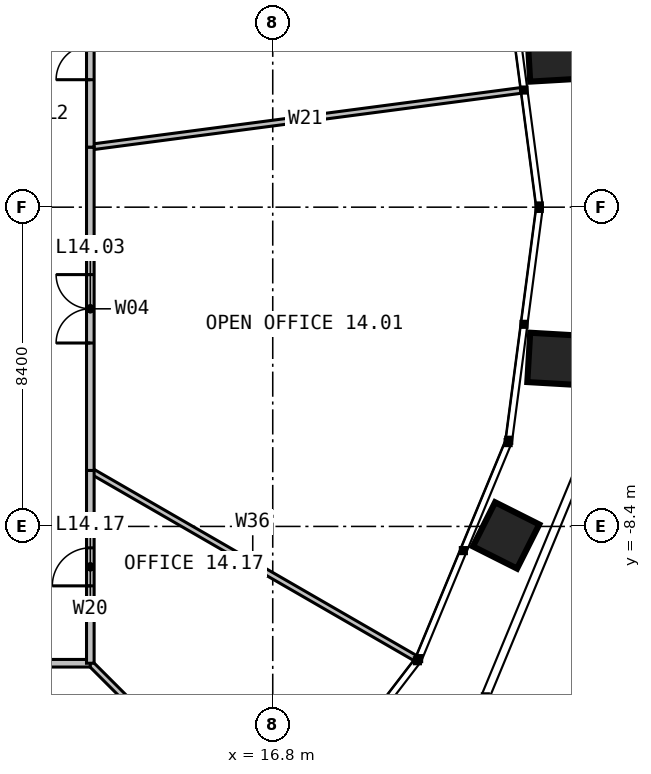
"""IFC4 building model, lengths in metres.
Left out: names, types, materials, properties, quantities, classifications, styles, units other than length and angle.
Written with IfcOpenShell. Run it as: python <this file> out.ifc"""

import sys

from ifc_helpers import new_model, si_unit, direction, frame, frame_2d, origin, place, context, subcontext, project, spatial, rectangle, extrude, element, fill, save


model = new_model("IFC4")
c1 = context("Model", 3, precision=1e-05, world=origin(), true_north=direction((0.0, 1.0)))
c2 = subcontext(c1, "Body", "Model", "MODEL_VIEW")
j1 = project(units=[si_unit("LENGTHUNIT", "METRE"), si_unit("PLANEANGLEUNIT", "RADIAN")], contexts=[c1])
p1 = place(None, origin())
s1 = spatial("IfcSite", under=j1, at=p1, CompositionType="ELEMENT")
p2 = place(p1, origin())
s2 = spatial("IfcBuilding", under=s1, at=p2, CompositionType="ELEMENT")
p3 = place(p2, frame((0.0, 0.0, 61.0)))
s3 = spatial("IfcBuildingStorey", under=s2, at=p3, CompositionType="ELEMENT", Elevation=61.0)
p4 = place(p3, frame((12.0, -6.928, 0.0), z_axis=(0.0, 0.0, 1.0), x_axis=(0.866031940362, -0.499988678145, 0.0)))
e1 = element("IfcWall", 1, at=p4, inside=s3, PredefinedType="PARTITIONING", context=c2, shape_type="SweptSolid", body=[
    extrude(rectangle(XDim=9.87, YDim=0.15, at=frame_2d((4.935, 0.0))), origin(), (0.0, 0.0, 1.0), 2.79),
])
p5 = place(p3, frame((12.0, 1.58, 0.0), z_axis=(0.0, 0.0, 1.0), x_axis=(0.99144592532, 0.130518110492, 0.0)))
e2 = element("IfcWall", 2, at=p5, inside=s3, PredefinedType="PARTITIONING", context=c2, shape_type="SweptSolid", body=[
    extrude(rectangle(XDim=11.42, YDim=0.15, at=frame_2d((5.71, 0.0))), origin(), (0.0, 0.0, 1.0), 2.79),
])
p6 = place(p3, frame((6.928, -12.0, 0.0), z_axis=(0.0, 0.0, 1.0), x_axis=(0.499988678145, -0.866031940362, 0.0)))
e3 = element("IfcWall", 3, at=p6, inside=s3, PredefinedType="PARTITIONING", context=c2, shape_type="SweptSolid", body=[
    extrude(rectangle(XDim=9.87, YDim=0.15, at=frame_2d((4.935, 0.0))), origin(), (0.0, 0.0, 1.0), 2.79),
])
p7 = place(p3, frame((12.0, -12.0, 0.0), z_axis=(0.0, 0.0, 1.0), x_axis=(0.707106781187, -0.707106781187, 0.0)))
e4 = element("IfcWall", 4, at=p7, inside=s3, PredefinedType="PARTITIONING", context=c2, shape_type="SweptSolid", body=[
    extrude(rectangle(XDim=6.756, YDim=0.15, at=frame_2d((3.378, 0.0))), origin(), (0.0, 0.0, 1.0), 2.79),
])
p8 = place(p3, frame((12.0, -6.928, 0.0), z_axis=(0.0, 0.0, 1.0), x_axis=(0.0, 1.0, 0.0)))
e5 = element("IfcWall", 5, at=p8, inside=s3, PredefinedType="PARTITIONING", context=c2, shape_type="SweptSolid", body=[
    extrude(rectangle(XDim=8.508, YDim=0.2, at=frame_2d((4.254, 0.0))), origin(), (0.0, 0.0, 1.0), 3.8),
])
p9 = place(p8, frame((3.354, 0.0, 0.0)))
e6 = element("IfcOpeningElement", 6, at=p9, cuts=e5, PredefinedType="OPENING", context=c2, shape_type="SweptSolid", body=[
    extrude(rectangle(XDim=1.8, YDim=2.2, at=frame_2d((0.9, 1.1))), frame((0.0, 0.11, 0.0), z_axis=(0.0, -1.0, 0.0), x_axis=(1.0, 0.0, 0.0)), (0.0, 0.0, 1.0), 0.22),
])
p10 = place(p3, frame((12.0, 1.58, 0.0), z_axis=(0.0, 0.0, 1.0), x_axis=(0.0, 1.0, 0.0)))
e7 = element("IfcWall", 7, at=p10, inside=s3, PredefinedType="PARTITIONING", context=c2, shape_type="SweptSolid", body=[
    extrude(rectangle(XDim=5.348, YDim=0.2, at=frame_2d((2.674, 0.0))), origin(), (0.0, 0.0, 1.0), 3.8),
])
p11 = place(p10, frame((1.774, 0.0, 0.0)))
e8 = element("IfcOpeningElement", 8, at=p11, cuts=e7, PredefinedType="OPENING", context=c2, shape_type="SweptSolid", body=[
    extrude(rectangle(XDim=1.8, YDim=2.2, at=frame_2d((0.9, 1.1))), frame((0.0, 0.11, 0.0), z_axis=(0.0, -1.0, 0.0), x_axis=(1.0, 0.0, 0.0)), (0.0, 0.0, 1.0), 0.22),
])
p12 = place(p3, frame((6.928, -12.0, 0.0), z_axis=(0.0, 0.0, 1.0), x_axis=(1.0, 0.0, 0.0)))
e9 = element("IfcWall", 9, at=p12, inside=s3, PredefinedType="PARTITIONING", context=c2, shape_type="SweptSolid", body=[
    extrude(rectangle(XDim=5.072, YDim=0.2, at=frame_2d((2.536, 0.0))), origin(), (0.0, 0.0, 1.0), 3.8),
])
p13 = place(p12, frame((2.036, 0.0, 0.0)))
e10 = element("IfcOpeningElement", 10, at=p13, cuts=e9, PredefinedType="OPENING", context=c2, shape_type="SweptSolid", body=[
    extrude(rectangle(XDim=1.0, YDim=2.2, at=frame_2d((0.5, 1.1))), frame((0.0, 0.11, 0.0), z_axis=(0.0, -1.0, 0.0), x_axis=(1.0, 0.0, 0.0)), (0.0, 0.0, 1.0), 0.22),
])
p14 = place(p3, frame((12.0, -12.0, 0.0), z_axis=(0.0, 0.0, 1.0), x_axis=(0.0, 1.0, 0.0)))
e11 = element("IfcWall", 11, at=p14, inside=s3, PredefinedType="PARTITIONING", context=c2, shape_type="SweptSolid", body=[
    extrude(rectangle(XDim=5.072, YDim=0.2, at=frame_2d((2.536, 0.0))), origin(), (0.0, 0.0, 1.0), 3.8),
])
p15 = place(p14, frame((2.036, 0.0, 0.0)))
e12 = element("IfcOpeningElement", 12, at=p15, cuts=e11, PredefinedType="OPENING", context=c2, shape_type="SweptSolid", body=[
    extrude(rectangle(XDim=1.0, YDim=2.2, at=frame_2d((0.5, 1.1))), frame((0.0, 0.11, 0.0), z_axis=(0.0, -1.0, 0.0), x_axis=(1.0, 0.0, 0.0)), (0.0, 0.0, 1.0), 0.22),
])
p16 = place(p9, origin())
e13 = element("IfcDoor", 13, at=p16, inside=s3, OperationType="DOUBLE_DOOR_SINGLE_SWING", PredefinedType="DOOR", context=c2, shape_type="SweptSolid", body=[
    extrude(rectangle(XDim=1.8, YDim=2.2, at=frame_2d((0.9, 1.1))), frame((0.0, 0.025, 0.0), z_axis=(0.0, -1.0, 0.0), x_axis=(1.0, 0.0, 0.0)), (0.0, 0.0, 1.0), 0.05),
])
fill(e6, e13)
p17 = place(p11, origin())
e14 = element("IfcDoor", 14, at=p17, inside=s3, OperationType="DOUBLE_DOOR_SINGLE_SWING", PredefinedType="DOOR", context=c2, shape_type="SweptSolid", body=[
    extrude(rectangle(XDim=1.8, YDim=2.2, at=frame_2d((0.9, 1.1))), frame((0.0, 0.025, 0.0), z_axis=(0.0, -1.0, 0.0), x_axis=(1.0, 0.0, 0.0)), (0.0, 0.0, 1.0), 0.05),
])
fill(e8, e14)
p18 = place(p15, origin())
e15 = element("IfcDoor", 15, at=p18, inside=s3, OperationType="SINGLE_SWING_LEFT", PredefinedType="DOOR", context=c2, shape_type="SweptSolid", body=[
    extrude(rectangle(XDim=1.0, YDim=2.2, at=frame_2d((0.5, 1.1))), frame((0.0, 0.025, 0.0), z_axis=(0.0, -1.0, 0.0), x_axis=(1.0, 0.0, 0.0)), (0.0, 0.0, 1.0), 0.05),
])
fill(e12, e15)
save(model, sys.argv[1])
